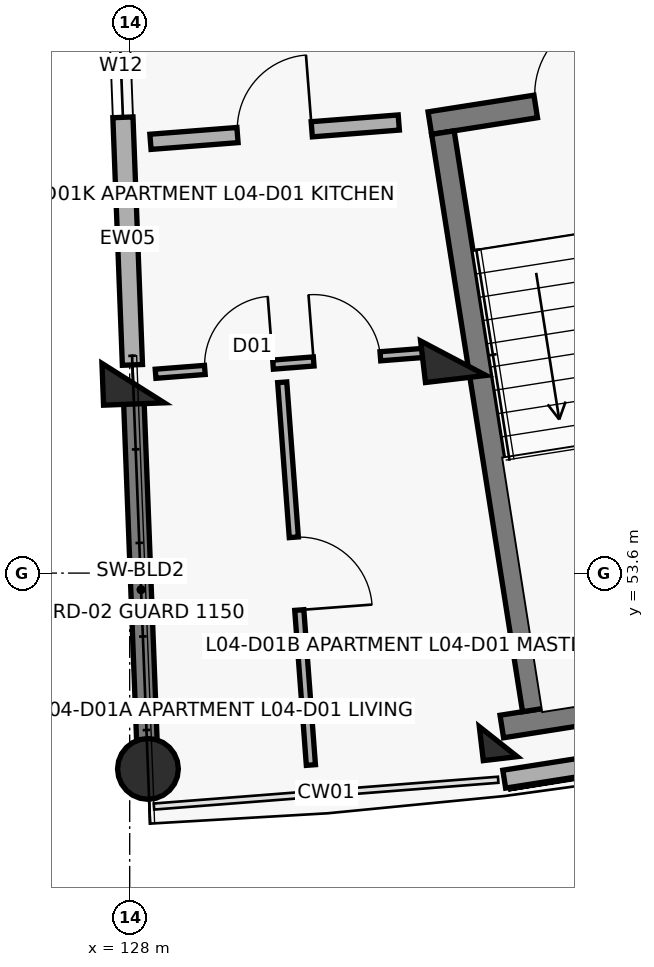
"""IFC4 building model, lengths in metres.
Left out: names, types, materials, properties, quantities, classifications, styles, units other than length and angle.
Written with IfcOpenShell. Run it as: python <this file> out.ifc"""

import sys

from ifc_helpers import new_model, si_unit, direction, frame, frame_2d, origin, origin_2d, place, context, subcontext, project, spatial, rectangle, circle, extrude, element, fill, save


model = new_model("IFC4")
c1 = context("Model", 3, precision=1e-05, world=origin(), true_north=direction((0.0, 1.0)))
c2 = subcontext(c1, "Body", "Model", "MODEL_VIEW")
j1 = project(units=[si_unit("LENGTHUNIT", "METRE"), si_unit("PLANEANGLEUNIT", "RADIAN")], contexts=[c1])
p1 = place(None, origin())
s1 = spatial("IfcSite", under=j1, at=p1, CompositionType="ELEMENT")
p2 = place(p1, origin())
s2 = spatial("IfcBuilding", under=s1, at=p2, CompositionType="ELEMENT")
p3 = place(p2, frame((0.0, 0.0, 14.3)))
s3 = spatial("IfcBuildingStorey", under=s2, at=p3, CompositionType="ELEMENT", Elevation=14.3)
p4 = place(p3, frame((128.045, 56.1, 0.0), z_axis=(0.0, 0.0, 1.0), x_axis=(0.038387809088, -0.999262916411, 0.0)))
e1 = element("IfcColumn", 1, at=p4, inside=s3, PredefinedType="COLUMN", context=c2, shape_type="SweptSolid", body=[
    extrude(rectangle(XDim=0.55, YDim=0.8, at=origin_2d()), origin(), (0.0, 0.0, 1.0), 3.1),
])
p5 = place(p3, frame((128.24, 51.023, 0.0), z_axis=(0.0, 0.0, 1.0), x_axis=(0.038387809088, -0.999262916411, 0.0)))
e2 = element("IfcColumn", 2, at=p5, inside=s3, PredefinedType="COLUMN", context=c2, shape_type="SweptSolid", body=[
    extrude(circle(Radius=0.4, at=origin_2d()), origin(), (0.0, 0.0, 1.0), 3.1),
])
p6 = place(p3, frame((132.257, 56.427, 0.0), z_axis=(0.0, 0.0, 1.0), x_axis=(0.116670737099, -0.993170649538, 0.0)))
e3 = element("IfcColumn", 3, at=p6, inside=s3, PredefinedType="COLUMN", context=c2, shape_type="SweptSolid", body=[
    extrude(rectangle(XDim=0.55, YDim=0.8, at=origin_2d()), origin(), (0.0, 0.0, 1.0), 3.1),
])
p7 = place(p3, frame((132.85, 51.382, 0.0), z_axis=(0.0, 0.0, 1.0), x_axis=(0.116670737099, -0.993170649538, 0.0)))
e4 = element("IfcColumn", 4, at=p7, inside=s3, PredefinedType="COLUMN", context=c2, shape_type="SweptSolid", body=[
    extrude(rectangle(XDim=0.45, YDim=0.45, at=origin_2d()), origin(), (0.0, 0.0, 1.0), 3.1),
])
p8 = place(p3, frame((128.052, 55.92, 0.0), z_axis=(0.0, 0.0, 1.0), x_axis=(0.038381471406, -0.99926315986, 0.0)))
e5 = element("IfcWall", 5, at=p8, inside=s3, PredefinedType="SHEAR", context=c2, shape_type="SweptSolid", body=[
    extrude(rectangle(XDim=4.72, YDim=0.27, at=frame_2d((2.36, 0.0))), origin(), (0.0, 0.0, 1.0), 2.86),
])
p9 = place(p3, frame((132.928, 50.889, 0.0), z_axis=(0.0, 0.0, 1.0), x_axis=(0.987828826394, 0.155544880165, 0.0)))
e6 = element("IfcWall", 6, at=p9, inside=s3, PredefinedType="SOLIDWALL", context=c2, shape_type="SweptSolid", body=[
    extrude(rectangle(XDim=4.622, YDim=0.238, at=frame_2d((2.311, 0.0))), origin(), (0.0, 0.0, 1.0), 2.25),
])
p10 = place(p3, frame((127.721, 64.533, 0.0), z_axis=(0.0, 0.0, 1.0), x_axis=(0.038407966241, -0.999262141847, 0.0)))
e7 = element("IfcWall", 7, at=p10, inside=s3, PredefinedType="SOLIDWALL", context=c2, shape_type="SweptSolid", body=[
    extrude(rectangle(XDim=8.2, YDim=0.265, at=frame_2d((4.1, 0.0))), origin(), (0.0, 0.0, 1.0), 2.08),
])
p11 = place(p10, frame((3.59, 0.0, 0.75)))
e8 = element("IfcOpeningElement", 8, at=p11, cuts=e7, PredefinedType="OPENING", context=c2, shape_type="SweptSolid", body=[
    extrude(rectangle(XDim=1.35, YDim=1.35, at=frame_2d((0.675, 0.675))), frame((0.0, 0.142, 0.0), z_axis=(0.0, -1.0, 0.0), x_axis=(1.0, 0.0, 0.0)), (0.0, 0.0, 1.0), 0.285),
])
p12 = place(p3, frame((131.949, 59.521, 0.0), z_axis=(0.0, 0.0, 1.0), x_axis=(0.98782579805, 0.155564111245, 0.0)))
e9 = element("IfcWall", 9, at=p12, inside=s3, PredefinedType="SHEAR", context=c2, shape_type="SweptSolid", body=[
    extrude(rectangle(XDim=3.87, YDim=0.3, at=frame_2d((1.935, 0.0))), origin(), (0.0, 0.0, 1.0), 3.1),
])
p13 = place(p12, frame((1.41, 0.0, 0.0)))
e10 = element("IfcOpeningElement", 10, at=p13, cuts=e9, PredefinedType="OPENING", context=c2, shape_type="SweptSolid", body=[
    extrude(rectangle(XDim=1.05, YDim=2.15, at=frame_2d((0.525, 1.075))), frame((0.0, 0.16, 0.0), z_axis=(0.0, -1.0, 0.0), x_axis=(1.0, 0.0, 0.0)), (0.0, 0.0, 1.0), 0.32),
])
p14 = place(p3, frame((132.896, 51.581, 0.0), z_axis=(0.0, 0.0, 1.0), x_axis=(0.987819142769, 0.155606366126, 0.0)))
e11 = element("IfcWall", 11, at=p14, inside=s3, PredefinedType="SHEAR", context=c2, shape_type="SweptSolid", body=[
    extrude(rectangle(XDim=4.47, YDim=0.3, at=frame_2d((2.235, 0.0))), origin(), (0.0, 0.0, 1.0), 3.1),
])
p15 = place(p3, frame((132.121, 59.396, 0.0), z_axis=(0.0, 0.0, 1.0), x_axis=(0.155563141844, -0.987825950712, 0.0)))
e12 = element("IfcWall", 12, at=p15, inside=s3, PredefinedType="SHEAR", context=c2, shape_type="SweptSolid", body=[
    extrude(rectangle(XDim=7.69, YDim=0.3, at=frame_2d((3.845, 0.0))), origin(), (0.0, 0.0, 1.0), 3.1),
])
p16 = place(p3, frame((128.273, 59.274, 0.0), z_axis=(0.0, 0.0, 1.0), x_axis=(0.996982624396, 0.077625038827, 0.0)))
e13 = element("IfcWall", 13, at=p16, inside=s3, PredefinedType="SOLIDWALL", context=c2, shape_type="SweptSolid", body=[
    extrude(rectangle(XDim=3.277, YDim=0.2, at=frame_2d((1.639, 0.0))), origin(), (0.0, 0.0, 1.0), 2.08),
])
p17 = place(p16, frame((1.148, 0.0, 0.0)))
e14 = element("IfcOpeningElement", 14, at=p17, cuts=e13, PredefinedType="OPENING", context=c2, shape_type="SweptSolid", body=[
    extrude(rectangle(XDim=0.98, YDim=2.15, at=frame_2d((0.49, 1.075))), frame((0.0, 0.11, 0.0), z_axis=(0.0, -1.0, 0.0), x_axis=(1.0, 0.0, 0.0)), (0.0, 0.0, 1.0), 0.22),
])
p18 = place(p3, frame((128.341, 56.223, 0.0), z_axis=(0.0, 0.0, 1.0), x_axis=(0.996986990942, 0.077568936389, 0.0)))
e15 = element("IfcWall", 15, at=p18, inside=s3, PredefinedType="PARTITIONING", context=c2, shape_type="SweptSolid", body=[
    extrude(rectangle(XDim=3.616, YDim=0.12, at=frame_2d((1.808, 0.0))), origin(), (0.0, 0.0, 1.0), 2.08),
])
p19 = place(p18, frame((0.65, 0.0, 0.0)))
e16 = element("IfcOpeningElement", 16, at=p19, cuts=e15, PredefinedType="OPENING", context=c2, shape_type="SweptSolid", body=[
    extrude(rectangle(XDim=0.9, YDim=2.1, at=frame_2d((0.45, 1.05))), frame((0.0, 0.07, 0.0), z_axis=(0.0, -1.0, 0.0), x_axis=(1.0, 0.0, 0.0)), (0.0, 0.0, 1.0), 0.14),
])
p20 = place(p18, frame((2.086, 0.0, 0.0)))
e17 = element("IfcOpeningElement", 17, at=p20, cuts=e15, PredefinedType="OPENING", context=c2, shape_type="SweptSolid", body=[
    extrude(rectangle(XDim=0.88, YDim=2.1, at=frame_2d((0.44, 1.05))), frame((0.0, 0.07, 0.0), z_axis=(0.0, -1.0, 0.0), x_axis=(1.0, 0.0, 0.0)), (0.0, 0.0, 1.0), 0.14),
])
p21 = place(p3, frame((130.007, 56.111, 0.0), z_axis=(0.0, 0.0, 1.0), x_axis=(0.074692597417, -0.997206606422, 0.0)))
e18 = element("IfcWall", 18, at=p21, inside=s3, PredefinedType="PARTITIONING", context=c2, shape_type="SweptSolid", body=[
    extrude(rectangle(XDim=5.05, YDim=0.12, at=frame_2d((2.525, 0.0))), origin(), (0.0, 0.0, 1.0), 2.08),
])
p22 = place(p21, frame((2.045, 0.0, 0.0)))
e19 = element("IfcOpeningElement", 19, at=p22, cuts=e18, PredefinedType="OPENING", context=c2, shape_type="SweptSolid", body=[
    extrude(rectangle(XDim=0.96, YDim=2.1, at=frame_2d((0.48, 1.05))), frame((0.0, 0.07, 0.0), z_axis=(0.0, -1.0, 0.0), x_axis=(1.0, 0.0, 0.0)), (0.0, 0.0, 1.0), 0.14),
])
p23 = place(p11, origin())
e20 = element("IfcWindow", 20, at=p23, inside=s3, PartitioningType="DOUBLE_PANEL_VERTICAL", PredefinedType="WINDOW", context=c2, shape_type="SweptSolid", body=[
    extrude(rectangle(XDim=1.35, YDim=1.35, at=frame_2d((0.675, 0.675))), frame((0.0, 0.03, 0.0), z_axis=(0.0, -1.0, 0.0), x_axis=(1.0, 0.0, 0.0)), (0.0, 0.0, 1.0), 0.06),
])
fill(e8, e20)
p24 = place(p13, origin())
e21 = element("IfcDoor", 21, at=p24, inside=s3, OperationType="SINGLE_SWING_RIGHT", PredefinedType="DOOR", context=c2, shape_type="SweptSolid", body=[
    extrude(rectangle(XDim=1.05, YDim=2.15, at=frame_2d((0.525, 1.075))), frame((0.0, 0.025, 0.0), z_axis=(0.0, -1.0, 0.0), x_axis=(1.0, 0.0, 0.0)), (0.0, 0.0, 1.0), 0.05),
])
fill(e10, e21)
p25 = place(p17, origin())
e22 = element("IfcDoor", 22, at=p25, inside=s3, OperationType="SINGLE_SWING_RIGHT", PredefinedType="DOOR", context=c2, shape_type="SweptSolid", body=[
    extrude(rectangle(XDim=0.98, YDim=2.15, at=frame_2d((0.49, 1.075))), frame((0.0, 0.025, 0.0), z_axis=(0.0, -1.0, 0.0), x_axis=(1.0, 0.0, 0.0)), (0.0, 0.0, 1.0), 0.05),
])
fill(e14, e22)
p26 = place(p19, origin())
e23 = element("IfcDoor", 23, at=p26, inside=s3, OperationType="SINGLE_SWING_RIGHT", PredefinedType="DOOR", context=c2, shape_type="SweptSolid", body=[
    extrude(rectangle(XDim=0.9, YDim=2.1, at=frame_2d((0.45, 1.05))), frame((0.0, 0.025, 0.0), z_axis=(0.0, -1.0, 0.0), x_axis=(1.0, 0.0, 0.0)), (0.0, 0.0, 1.0), 0.05),
])
fill(e16, e23)
p27 = place(p20, origin())
e24 = element("IfcDoor", 24, at=p27, inside=s3, OperationType="SINGLE_SWING_LEFT", PredefinedType="DOOR", context=c2, shape_type="SweptSolid", body=[
    extrude(rectangle(XDim=0.88, YDim=2.1, at=frame_2d((0.44, 1.05))), frame((0.0, 0.025, 0.0), z_axis=(0.0, -1.0, 0.0), x_axis=(1.0, 0.0, 0.0)), (0.0, 0.0, 1.0), 0.05),
])
fill(e17, e24)
p28 = place(p22, origin())
e25 = element("IfcDoor", 25, at=p28, inside=s3, OperationType="SINGLE_SWING_RIGHT", PredefinedType="DOOR", context=c2, shape_type="SweptSolid", body=[
    extrude(rectangle(XDim=0.96, YDim=2.1, at=frame_2d((0.48, 1.05))), frame((0.0, 0.025, 0.0), z_axis=(0.0, -1.0, 0.0), x_axis=(1.0, 0.0, 0.0)), (0.0, 0.0, 1.0), 0.05),
])
fill(e19, e25)
save(model, sys.argv[1])
